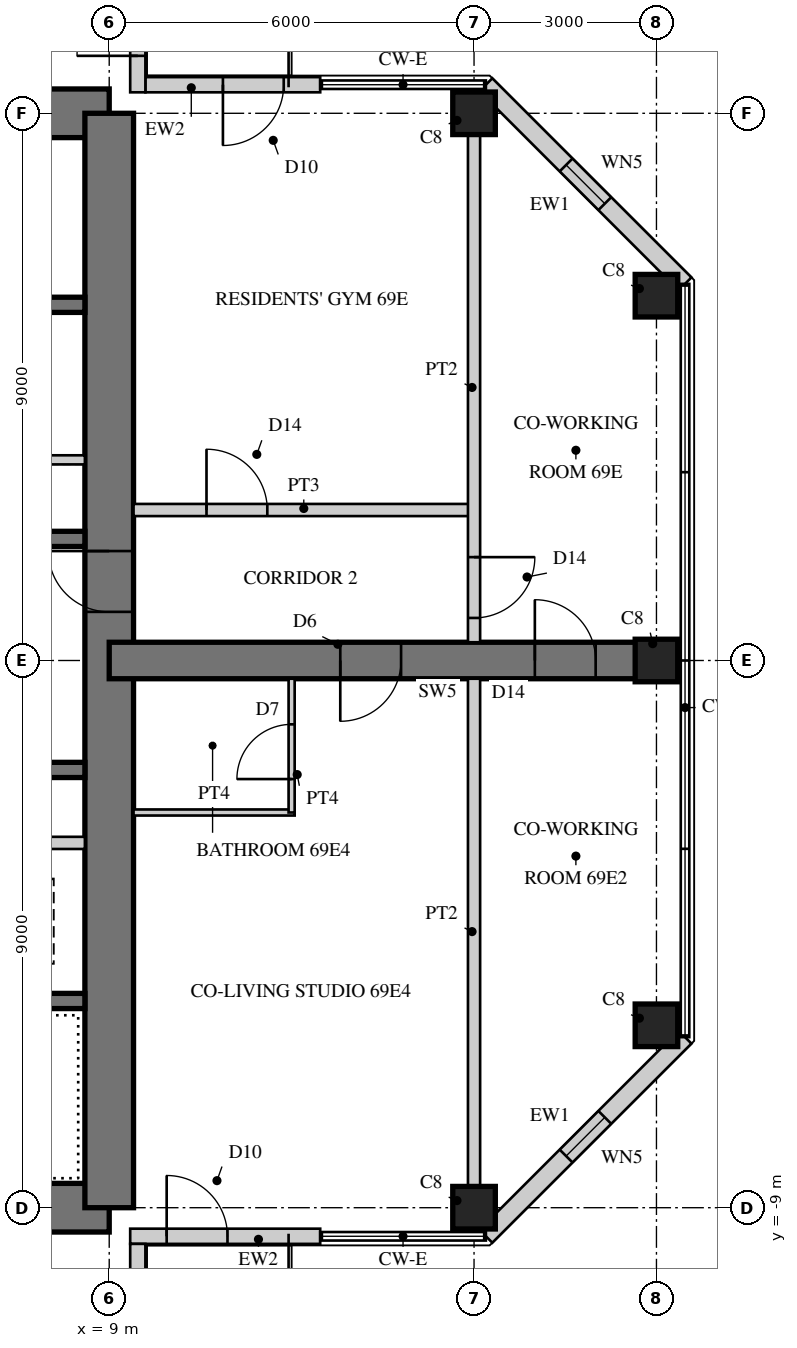
"""IFC4 building model, lengths in metres.
Left out: names, types, materials, properties, quantities, classifications, styles, units other than length and angle.
Written with IfcOpenShell. Run it as: python <this file> out.ifc"""

import sys

from ifc_helpers import new_model, si_unit, direction, frame, frame_2d, origin, origin_2d, place, context, subcontext, project, spatial, rectangle, hollow_rectangle, extrude, element, fill, save


model = new_model("IFC4")
c1 = context("Model", 3, precision=1e-05, world=origin(), true_north=direction((0.0, 1.0)))
c2 = subcontext(c1, "Body", "Model", "MODEL_VIEW")
j1 = project(units=[si_unit("LENGTHUNIT", "METRE"), si_unit("PLANEANGLEUNIT", "RADIAN")], contexts=[c1])
p1 = place(None, origin())
s1 = spatial("IfcSite", under=j1, at=p1, CompositionType="ELEMENT")
p2 = place(p1, origin())
s2 = spatial("IfcBuilding", under=s1, at=p2, CompositionType="ELEMENT")
p3 = place(p2, frame((0.0, 0.0, 267.9)))
s3 = spatial("IfcBuildingStorey", under=s2, at=p3, CompositionType="ELEMENT", Elevation=267.9)
p4 = place(p3, frame((9.0, 9.0, 0.0), z_axis=(0.0, 0.0, 1.0), x_axis=(-1.0, 0.0, 0.0)))
e1 = element("IfcWall", 1, at=p4, inside=s3, PredefinedType="SHEAR", context=c2, shape_type="SweptSolid", body=[
    extrude(rectangle(XDim=18.0, YDim=0.8, at=frame_2d((9.0, 0.0))), origin(), (0.0, 0.0, 1.0), 3.4),
])
p5 = place(p4, frame((9.8, 0.0, 0.0)))
e2 = element("IfcOpeningElement", 2, at=p5, cuts=e1, PredefinedType="OPENING", context=c2, shape_type="SweptSolid", body=[
    extrude(rectangle(XDim=1.0, YDim=2.4, at=frame_2d((0.5, 1.2))), frame((0.0, 0.41, 0.0), z_axis=(0.0, -1.0, 0.0), x_axis=(1.0, 0.0, 0.0)), (0.0, 0.0, 1.0), 0.82),
])
p6 = place(p3, frame((-9.0, -9.0, 0.0), z_axis=(0.0, 0.0, 1.0), x_axis=(1.0, 0.0, 0.0)))
e3 = element("IfcWall", 3, at=p6, inside=s3, PredefinedType="SHEAR", context=c2, shape_type="SweptSolid", body=[
    extrude(rectangle(XDim=18.0, YDim=0.8, at=frame_2d((9.0, 0.0))), origin(), (0.0, 0.0, 1.0), 3.4),
])
p7 = place(p6, frame((9.8, 0.0, 0.0)))
e4 = element("IfcOpeningElement", 4, at=p7, cuts=e3, PredefinedType="OPENING", context=c2, shape_type="SweptSolid", body=[
    extrude(rectangle(XDim=1.0, YDim=2.4, at=frame_2d((0.5, 1.2))), frame((0.0, 0.41, 0.0), z_axis=(0.0, -1.0, 0.0), x_axis=(1.0, 0.0, 0.0)), (0.0, 0.0, 1.0), 0.82),
])
p8 = place(p3, frame((9.0, -9.0, 0.0), z_axis=(0.0, 0.0, 1.0), x_axis=(0.0, 1.0, 0.0)))
e5 = element("IfcWall", 5, at=p8, inside=s3, PredefinedType="SHEAR", context=c2, shape_type="SweptSolid", body=[
    extrude(rectangle(XDim=18.0, YDim=0.8, at=frame_2d((9.0, 0.0))), origin(), (0.0, 0.0, 1.0), 3.4),
])
p9 = place(p8, frame((9.8, 0.0, 0.0)))
e6 = element("IfcOpeningElement", 6, at=p9, cuts=e5, PredefinedType="OPENING", context=c2, shape_type="SweptSolid", body=[
    extrude(rectangle(XDim=1.0, YDim=2.4, at=frame_2d((0.5, 1.2))), frame((0.0, 0.41, 0.0), z_axis=(0.0, -1.0, 0.0), x_axis=(1.0, 0.0, 0.0)), (0.0, 0.0, 1.0), 0.82),
])
p10 = place(p3, frame((1.925, 2.0, 0.0), z_axis=(0.0, 0.0, 1.0), x_axis=(1.0, 0.0, 0.0)))
e7 = element("IfcWall", 7, at=p10, inside=s3, PredefinedType="SHEAR", context=c2, shape_type="SweptSolid", body=[
    extrude(rectangle(XDim=6.675, YDim=0.25, at=frame_2d((3.337, 0.0))), origin(), (0.0, 0.0, 1.0), 3.4),
])
p11 = place(p3, frame((1.925, 5.85, 0.0), z_axis=(0.0, 0.0, 1.0), x_axis=(1.0, 0.0, 0.0)))
e8 = element("IfcWall", 8, at=p11, inside=s3, PredefinedType="SHEAR", context=c2, shape_type="SweptSolid", body=[
    extrude(rectangle(XDim=6.675, YDim=0.25, at=frame_2d((3.337, 0.0))), origin(), (0.0, 0.0, 1.0), 3.4),
])
p12 = place(p11, frame((0.546, 0.0, 0.0)))
e9 = element("IfcOpeningElement", 9, at=p12, cuts=e8, PredefinedType="OPENING", context=c2, shape_type="SweptSolid", body=[
    extrude(rectangle(XDim=1.0, YDim=2.1, at=frame_2d((0.5, 1.05))), frame((0.0, 0.135, 0.0), z_axis=(0.0, -1.0, 0.0), x_axis=(1.0, 0.0, 0.0)), (0.0, 0.0, 1.0), 0.27),
])
p13 = place(p3, frame((1.925, 3.3, 0.0), z_axis=(0.0, 0.0, 1.0), x_axis=(1.0, 0.0, 0.0)))
e10 = element("IfcWall", 10, at=p13, inside=s3, PredefinedType="PARTITIONING", context=c2, shape_type="SweptSolid", body=[
    extrude(rectangle(XDim=6.675, YDim=0.15, at=frame_2d((3.337, 0.0))), origin(), (0.0, 0.0, 1.0), 3.4),
])
p14 = place(p13, frame((0.075, 0.0, 0.0)))
e11 = element("IfcOpeningElement", 11, at=p14, cuts=e10, PredefinedType="OPENING", context=c2, shape_type="SweptSolid", body=[
    extrude(rectangle(XDim=0.8, YDim=2.1, at=frame_2d((0.4, 1.05))), frame((0.0, 0.085, 0.0), z_axis=(0.0, -1.0, 0.0), x_axis=(1.0, 0.0, 0.0)), (0.0, 0.0, 1.0), 0.17),
])
p15 = place(p13, frame((3.675, 0.0, 0.0)))
e12 = element("IfcOpeningElement", 12, at=p15, cuts=e10, PredefinedType="OPENING", context=c2, shape_type="SweptSolid", body=[
    extrude(rectangle(XDim=0.8, YDim=2.1, at=frame_2d((0.4, 1.05))), frame((0.0, 0.085, 0.0), z_axis=(0.0, -1.0, 0.0), x_axis=(1.0, 0.0, 0.0)), (0.0, 0.0, 1.0), 0.17),
])
p16 = place(p3, frame((2.125, -1.8, 0.0), z_axis=(0.0, 0.0, 1.0), x_axis=(1.0, 0.0, 0.0)))
e13 = element("IfcWall", 13, at=p16, inside=s3, PredefinedType="SHEAR", context=c2, shape_type="SweptSolid", body=[
    extrude(rectangle(XDim=6.475, YDim=0.25, at=frame_2d((3.238, 0.0))), origin(), (0.0, 0.0, 1.0), 3.4),
])
p17 = place(p3, frame((2.125, -5.6, 0.0), z_axis=(0.0, 0.0, 1.0), x_axis=(1.0, 0.0, 0.0)))
e14 = element("IfcWall", 14, at=p17, inside=s3, PredefinedType="SHEAR", context=c2, shape_type="SweptSolid", body=[
    extrude(rectangle(XDim=6.475, YDim=0.25, at=frame_2d((3.238, 0.0))), origin(), (0.0, 0.0, 1.0), 3.4),
])
p18 = place(p17, frame((0.175, 0.0, 0.0)))
e15 = element("IfcOpeningElement", 15, at=p18, cuts=e14, PredefinedType="OPENING", context=c2, shape_type="SweptSolid", body=[
    extrude(rectangle(XDim=1.0, YDim=2.1, at=frame_2d((0.5, 1.05))), frame((0.0, 0.135, 0.0), z_axis=(0.0, -1.0, 0.0), x_axis=(1.0, 0.0, 0.0)), (0.0, 0.0, 1.0), 0.27),
])
p19 = place(p3, frame((5.725, -3.0, 0.0), z_axis=(0.0, 0.0, 1.0), x_axis=(1.0, 0.0, 0.0)))
e16 = element("IfcWall", 16, at=p19, inside=s3, PredefinedType="PARTITIONING", context=c2, shape_type="SweptSolid", body=[
    extrude(rectangle(XDim=2.875, YDim=0.2, at=frame_2d((1.438, 0.0))), origin(), (0.0, 0.0, 1.0), 3.4),
])
p20 = place(p3, frame((9.0, 0.0, 0.0), z_axis=(0.0, 0.0, 1.0), x_axis=(1.0, 0.0, 0.0)))
e17 = element("IfcWall", 17, at=p20, inside=s3, PredefinedType="SHEAR", context=c2, shape_type="SweptSolid", body=[
    extrude(rectangle(XDim=9.0, YDim=0.6, at=frame_2d((4.5, 0.0))), origin(), (0.0, 0.0, 1.0), 3.4),
])
p21 = place(p20, frame((3.8, 0.0, 0.0)))
e18 = element("IfcOpeningElement", 18, at=p21, cuts=e17, PredefinedType="OPENING", context=c2, shape_type="SweptSolid", body=[
    extrude(rectangle(XDim=1.0, YDim=2.15, at=frame_2d((0.5, 1.075))), frame((0.0, 0.31, 0.0), z_axis=(0.0, -1.0, 0.0), x_axis=(1.0, 0.0, 0.0)), (0.0, 0.0, 1.0), 0.62),
])
p22 = place(p20, frame((7.0, 0.0, 0.0)))
e19 = element("IfcOpeningElement", 19, at=p22, cuts=e17, PredefinedType="OPENING", context=c2, shape_type="SweptSolid", body=[
    extrude(rectangle(XDim=1.0, YDim=2.2, at=frame_2d((0.5, 1.1))), frame((0.0, 0.31, 0.0), z_axis=(0.0, -1.0, 0.0), x_axis=(1.0, 0.0, 0.0)), (0.0, 0.0, 1.0), 0.62),
])
for number, where, z_axis, x_axis in (
    (20, (15.0, -9.0, 0.0), (0.0, 0.0, 1.0), (1.0, 0.0, 0.0)),
    (21, (15.0, 9.0, 0.0), (0.0, 0.0, 1.0), (1.0, 0.0, 0.0)),
    (22, (18.0, -6.0, 0.0), (0.0, 0.0, 1.0), (1.0, 0.0, 0.0)),
    (23, (18.0, 0.0, 0.0), (0.0, 0.0, 1.0), (1.0, 0.0, 0.0)),
    (24, (18.0, 6.0, 0.0), (0.0, 0.0, 1.0), (1.0, 0.0, 0.0)),
):
    element("IfcColumn", number, at=place(p3, frame(where, z_axis=z_axis, x_axis=x_axis)), inside=s3, PredefinedType="COLUMN", context=c2, shape_type="SweptSolid", body=[
        extrude(rectangle(XDim=0.7, YDim=0.7, at=origin_2d()), origin(), (0.0, 0.0, 1.0), 3.4),
    ])
p23 = place(p3, frame((9.345, -9.47, 0.0), z_axis=(0.0, 0.0, 1.0), x_axis=(1.0, 0.0, 0.0)))
e25 = element("IfcWall", 25, at=p23, inside=s3, PredefinedType="SOLIDWALL", context=c2, shape_type="SweptSolid", body=[
    extrude(rectangle(XDim=3.125, YDim=0.25, at=frame_2d((1.562, 0.0))), origin(), (0.0, 0.0, 1.0), 3.22),
])
p24 = place(p23, frame((0.6, 0.0, 0.0)))
e26 = element("IfcOpeningElement", 26, at=p24, cuts=e25, PredefinedType="OPENING", context=c2, shape_type="SweptSolid", body=[
    extrude(rectangle(XDim=1.0, YDim=2.2, at=frame_2d((0.5, 1.1))), frame((0.0, 0.135, 0.0), z_axis=(0.0, -1.0, 0.0), x_axis=(1.0, 0.0, 0.0)), (0.0, 0.0, 1.0), 0.27),
])
p25 = place(p3, frame((15.195, -9.47, 0.0), z_axis=(0.0, 0.0, 1.0), x_axis=(0.707106781187, 0.707106781187, 0.0)))
e27 = element("IfcWall", 27, at=p25, inside=s3, PredefinedType="SOLIDWALL", context=c2, shape_type="SweptSolid", body=[
    extrude(rectangle(XDim=4.632, YDim=0.3, at=frame_2d((2.316, 0.0))), origin(), (0.0, 0.0, 1.0), 3.22),
])
p26 = place(p25, frame((1.866, 0.0, 0.3)))
e28 = element("IfcOpeningElement", 28, at=p26, cuts=e27, PredefinedType="OPENING", context=c2, shape_type="SweptSolid", body=[
    extrude(rectangle(XDim=0.9, YDim=2.4, at=frame_2d((0.45, 1.2))), frame((0.0, 0.16, 0.0), z_axis=(0.0, -1.0, 0.0), x_axis=(1.0, 0.0, 0.0)), (0.0, 0.0, 1.0), 0.32),
])
p27 = place(p3, frame((18.47, 6.195, 0.0), z_axis=(0.0, 0.0, 1.0), x_axis=(-0.707106781187, 0.707106781187, 0.0)))
e29 = element("IfcWall", 29, at=p27, inside=s3, PredefinedType="SOLIDWALL", context=c2, shape_type="SweptSolid", body=[
    extrude(rectangle(XDim=4.632, YDim=0.3, at=frame_2d((2.316, 0.0))), origin(), (0.0, 0.0, 1.0), 3.22),
])
p28 = place(p27, frame((1.866, 0.0, 0.3)))
e30 = element("IfcOpeningElement", 30, at=p28, cuts=e29, PredefinedType="OPENING", context=c2, shape_type="SweptSolid", body=[
    extrude(rectangle(XDim=0.9, YDim=2.4, at=frame_2d((0.45, 1.2))), frame((0.0, 0.16, 0.0), z_axis=(0.0, -1.0, 0.0), x_axis=(1.0, 0.0, 0.0)), (0.0, 0.0, 1.0), 0.32),
])
p29 = place(p3, frame((12.47, 9.47, 0.0), z_axis=(0.0, 0.0, 1.0), x_axis=(-1.0, 0.0, 0.0)))
e31 = element("IfcWall", 31, at=p29, inside=s3, PredefinedType="SOLIDWALL", context=c2, shape_type="SweptSolid", body=[
    extrude(rectangle(XDim=2.875, YDim=0.25, at=frame_2d((1.438, 0.0))), origin(), (0.0, 0.0, 1.0), 3.22),
])
p30 = place(p29, frame((0.6, 0.0, 0.0)))
e32 = element("IfcOpeningElement", 32, at=p30, cuts=e31, PredefinedType="OPENING", context=c2, shape_type="SweptSolid", body=[
    extrude(rectangle(XDim=1.0, YDim=2.2, at=frame_2d((0.5, 1.1))), frame((0.0, 0.135, 0.0), z_axis=(0.0, -1.0, 0.0), x_axis=(1.0, 0.0, 0.0)), (0.0, 0.0, 1.0), 0.27),
])
p31 = place(p3, frame((9.47, 9.345, 0.0), z_axis=(0.0, 0.0, 1.0), x_axis=(0.0, 1.0, 0.0)))
e33 = element("IfcWall", 33, at=p31, inside=s3, PredefinedType="SOLIDWALL", context=c2, shape_type="SweptSolid", body=[
    extrude(rectangle(XDim=3.125, YDim=0.25, at=frame_2d((1.562, 0.0))), origin(), (0.0, 0.0, 1.0), 3.22),
])
p32 = place(p31, frame((0.6, 0.0, 0.0)))
e34 = element("IfcOpeningElement", 34, at=p32, cuts=e33, PredefinedType="OPENING", context=c2, shape_type="SweptSolid", body=[
    extrude(rectangle(XDim=1.0, YDim=2.2, at=frame_2d((0.5, 1.1))), frame((0.0, 0.135, 0.0), z_axis=(0.0, -1.0, 0.0), x_axis=(1.0, 0.0, 0.0)), (0.0, 0.0, 1.0), 0.27),
])
p33 = place(p3, frame((9.47, -12.47, 0.0), z_axis=(0.0, 0.0, 1.0), x_axis=(0.0, 1.0, 0.0)))
e35 = element("IfcWall", 35, at=p33, inside=s3, PredefinedType="SOLIDWALL", context=c2, shape_type="SweptSolid", body=[
    extrude(rectangle(XDim=2.875, YDim=0.25, at=frame_2d((1.438, 0.0))), origin(), (0.0, 0.0, 1.0), 3.22),
])
p34 = place(p33, frame((0.6, 0.0, 0.0)))
e36 = element("IfcOpeningElement", 36, at=p34, cuts=e35, PredefinedType="OPENING", context=c2, shape_type="SweptSolid", body=[
    extrude(rectangle(XDim=1.0, YDim=2.2, at=frame_2d((0.5, 1.1))), frame((0.0, 0.135, 0.0), z_axis=(0.0, -1.0, 0.0), x_axis=(1.0, 0.0, 0.0)), (0.0, 0.0, 1.0), 0.27),
])
p35 = place(p3, frame((9.4, -2.5, 0.0), z_axis=(0.0, 0.0, 1.0), x_axis=(1.0, 0.0, 0.0)))
e37 = element("IfcWall", 37, at=p35, inside=s3, PredefinedType="PARTITIONING", context=c2, shape_type="SweptSolid", body=[
    extrude(rectangle(XDim=2.65, YDim=0.1, at=frame_2d((1.325, 0.0))), origin(), (0.0, 0.0, 1.0), 3.22),
])
p36 = place(p3, frame((12.0, -2.5, 0.0), z_axis=(0.0, 0.0, 1.0), x_axis=(0.0, 1.0, 0.0)))
e38 = element("IfcWall", 38, at=p36, inside=s3, PredefinedType="PARTITIONING", context=c2, shape_type="SweptSolid", body=[
    extrude(rectangle(XDim=2.2, YDim=0.1, at=frame_2d((1.1, 0.0))), origin(), (0.0, 0.0, 1.0), 3.22),
])
p37 = place(p36, frame((0.55, 0.0, 0.0)))
e39 = element("IfcOpeningElement", 39, at=p37, cuts=e38, PredefinedType="OPENING", context=c2, shape_type="SweptSolid", body=[
    extrude(rectangle(XDim=0.9, YDim=2.1, at=frame_2d((0.45, 1.05))), frame((0.0, 0.06, 0.0), z_axis=(0.0, -1.0, 0.0), x_axis=(1.0, 0.0, 0.0)), (0.0, 0.0, 1.0), 0.12),
])
p38 = place(p3, frame((9.4, 2.475, 0.0), z_axis=(0.0, 0.0, 1.0), x_axis=(1.0, 0.0, 0.0)))
e40 = element("IfcWall", 40, at=p38, inside=s3, PredefinedType="SOLIDWALL", context=c2, shape_type="SweptSolid", body=[
    extrude(rectangle(XDim=5.6, YDim=0.2, at=frame_2d((2.8, 0.0))), origin(), (0.0, 0.0, 1.0), 3.22),
])
p39 = place(p38, frame((1.2, 0.0, 0.0)))
e41 = element("IfcOpeningElement", 41, at=p39, cuts=e40, PredefinedType="OPENING", context=c2, shape_type="SweptSolid", body=[
    extrude(rectangle(XDim=1.0, YDim=2.2, at=frame_2d((0.5, 1.1))), frame((0.0, 0.11, 0.0), z_axis=(0.0, -1.0, 0.0), x_axis=(1.0, 0.0, 0.0)), (0.0, 0.0, 1.0), 0.22),
])
p40 = place(p3, frame((15.0, -8.65, 0.0), z_axis=(0.0, 0.0, 1.0), x_axis=(0.0, 1.0, 0.0)))
e42 = element("IfcWall", 42, at=p40, inside=s3, PredefinedType="SOLIDWALL", context=c2, shape_type="SweptSolid", body=[
    extrude(rectangle(XDim=8.35, YDim=0.2, at=frame_2d((4.175, 0.0))), origin(), (0.0, 0.0, 1.0), 2.52),
])
p41 = place(p3, frame((15.0, 0.3, 0.0), z_axis=(0.0, 0.0, 1.0), x_axis=(0.0, 1.0, 0.0)))
e43 = element("IfcWall", 43, at=p41, inside=s3, PredefinedType="SOLIDWALL", context=c2, shape_type="SweptSolid", body=[
    extrude(rectangle(XDim=8.35, YDim=0.2, at=frame_2d((4.175, 0.0))), origin(), (0.0, 0.0, 1.0), 2.52),
])
p42 = place(p41, frame((0.4, 0.0, 0.0)))
e44 = element("IfcOpeningElement", 44, at=p42, cuts=e43, PredefinedType="OPENING", context=c2, shape_type="SweptSolid", body=[
    extrude(rectangle(XDim=1.0, YDim=2.2, at=frame_2d((0.5, 1.1))), frame((0.0, 0.11, 0.0), z_axis=(0.0, -1.0, 0.0), x_axis=(1.0, 0.0, 0.0)), (0.0, 0.0, 1.0), 0.22),
])
p43 = place(p24, origin())
e45 = element("IfcDoor", 45, at=p43, inside=s3, OperationType="SINGLE_SWING_LEFT", PredefinedType="DOOR", context=c2, shape_type="SweptSolid", body=[
    extrude(hollow_rectangle(XDim=1.0, YDim=2.2, WallThickness=0.06, at=frame_2d((0.5, 1.1))), frame((0.0, 0.025, 0.0), z_axis=(0.0, -1.0, 0.0), x_axis=(1.0, 0.0, 0.0)), (0.0, 0.0, 1.0), 0.05),
    extrude(rectangle(XDim=0.879, YDim=2.079, at=frame_2d((0.5, 1.1))), frame((0.0, 0.025, 0.0), z_axis=(0.0, -1.0, 0.0), x_axis=(1.0, 0.0, 0.0)), (0.0, 0.0, 1.0), 0.05),
])
fill(e26, e45)
p44 = place(p26, origin())
e46 = element("IfcWindow", 46, at=p44, inside=s3, PartitioningType="SINGLE_PANEL", PredefinedType="WINDOW", context=c2, shape_type="SweptSolid", body=[
    extrude(hollow_rectangle(XDim=0.9, YDim=2.4, WallThickness=0.06, at=frame_2d((0.45, 1.2))), frame((0.0, 0.03, 0.0), z_axis=(0.0, -1.0, 0.0), x_axis=(1.0, 0.0, 0.0)), (0.0, 0.0, 1.0), 0.06),
    extrude(rectangle(XDim=0.779, YDim=2.279, at=frame_2d((0.45, 1.2))), frame((0.0, 0.03, 0.0), z_axis=(0.0, -1.0, 0.0), x_axis=(1.0, 0.0, 0.0)), (0.0, 0.0, 1.0), 0.06),
])
fill(e28, e46)
p45 = place(p28, origin())
e47 = element("IfcWindow", 47, at=p45, inside=s3, PartitioningType="SINGLE_PANEL", PredefinedType="WINDOW", context=c2, shape_type="SweptSolid", body=[
    extrude(hollow_rectangle(XDim=0.9, YDim=2.4, WallThickness=0.06, at=frame_2d((0.45, 1.2))), frame((0.0, 0.03, 0.0), z_axis=(0.0, -1.0, 0.0), x_axis=(1.0, 0.0, 0.0)), (0.0, 0.0, 1.0), 0.06),
    extrude(rectangle(XDim=0.779, YDim=2.279, at=frame_2d((0.45, 1.2))), frame((0.0, 0.03, 0.0), z_axis=(0.0, -1.0, 0.0), x_axis=(1.0, 0.0, 0.0)), (0.0, 0.0, 1.0), 0.06),
])
fill(e30, e47)
p46 = place(p30, origin())
e48 = element("IfcDoor", 48, at=p46, inside=s3, OperationType="SINGLE_SWING_RIGHT", PredefinedType="DOOR", context=c2, shape_type="SweptSolid", body=[
    extrude(hollow_rectangle(XDim=1.0, YDim=2.2, WallThickness=0.06, at=frame_2d((0.5, 1.1))), frame((0.0, 0.025, 0.0), z_axis=(0.0, -1.0, 0.0), x_axis=(1.0, 0.0, 0.0)), (0.0, 0.0, 1.0), 0.05),
    extrude(rectangle(XDim=0.879, YDim=2.079, at=frame_2d((0.5, 1.1))), frame((0.0, 0.025, 0.0), z_axis=(0.0, -1.0, 0.0), x_axis=(1.0, 0.0, 0.0)), (0.0, 0.0, 1.0), 0.05),
])
fill(e32, e48)
p47 = place(p32, origin())
e49 = element("IfcDoor", 49, at=p47, inside=s3, OperationType="SINGLE_SWING_LEFT", PredefinedType="DOOR", context=c2, shape_type="SweptSolid", body=[
    extrude(hollow_rectangle(XDim=1.0, YDim=2.2, WallThickness=0.06, at=frame_2d((0.5, 1.1))), frame((0.0, 0.025, 0.0), z_axis=(0.0, -1.0, 0.0), x_axis=(1.0, 0.0, 0.0)), (0.0, 0.0, 1.0), 0.05),
    extrude(rectangle(XDim=0.879, YDim=2.079, at=frame_2d((0.5, 1.1))), frame((0.0, 0.025, 0.0), z_axis=(0.0, -1.0, 0.0), x_axis=(1.0, 0.0, 0.0)), (0.0, 0.0, 1.0), 0.05),
])
fill(e34, e49)
p48 = place(p37, origin())
e50 = element("IfcDoor", 50, at=p48, inside=s3, OperationType="SINGLE_SWING_LEFT", PredefinedType="DOOR", context=c2, shape_type="SweptSolid", body=[
    extrude(rectangle(XDim=0.9, YDim=2.1, at=frame_2d((0.45, 1.05))), frame((0.0, 0.025, 0.0), z_axis=(0.0, -1.0, 0.0), x_axis=(1.0, 0.0, 0.0)), (0.0, 0.0, 1.0), 0.05),
])
fill(e39, e50)
p49 = place(p39, origin())
e51 = element("IfcDoor", 51, at=p49, inside=s3, OperationType="SINGLE_SWING_LEFT", PredefinedType="DOOR", context=c2, shape_type="SweptSolid", body=[
    extrude(rectangle(XDim=1.0, YDim=2.2, at=frame_2d((0.5, 1.1))), frame((0.0, 0.025, 0.0), z_axis=(0.0, -1.0, 0.0), x_axis=(1.0, 0.0, 0.0)), (0.0, 0.0, 1.0), 0.05),
])
fill(e41, e51)
p50 = place(p42, frame((1.0, 0.0, 0.0), z_axis=(0.0, 0.0, 1.0), x_axis=(-1.0, 0.0, 0.0)))
e52 = element("IfcDoor", 52, at=p50, inside=s3, OperationType="SINGLE_SWING_LEFT", PredefinedType="DOOR", context=c2, shape_type="SweptSolid", body=[
    extrude(rectangle(XDim=1.0, YDim=2.2, at=frame_2d((0.5, 1.1))), frame((0.0, 0.025, 0.0), z_axis=(0.0, -1.0, 0.0), x_axis=(1.0, 0.0, 0.0)), (0.0, 0.0, 1.0), 0.05),
])
fill(e44, e52)
p51 = place(p21, frame((1.0, 0.0, 0.0), z_axis=(0.0, 0.0, 1.0), x_axis=(-1.0, 0.0, 0.0)))
e53 = element("IfcDoor", 53, at=p51, inside=s3, OperationType="SINGLE_SWING_RIGHT", PredefinedType="DOOR", context=c2, shape_type="SweptSolid", body=[
    extrude(rectangle(XDim=1.0, YDim=2.15, at=frame_2d((0.5, 1.075))), frame((0.0, 0.025, 0.0), z_axis=(0.0, -1.0, 0.0), x_axis=(1.0, 0.0, 0.0)), (0.0, 0.0, 1.0), 0.05),
])
fill(e18, e53)
p52 = place(p22, origin())
e54 = element("IfcDoor", 54, at=p52, inside=s3, OperationType="SINGLE_SWING_LEFT", PredefinedType="DOOR", context=c2, shape_type="SweptSolid", body=[
    extrude(rectangle(XDim=1.0, YDim=2.2, at=frame_2d((0.5, 1.1))), frame((0.0, 0.025, 0.0), z_axis=(0.0, -1.0, 0.0), x_axis=(1.0, 0.0, 0.0)), (0.0, 0.0, 1.0), 0.05),
])
fill(e19, e54)
p53 = place(p9, origin())
e55 = element("IfcDoor", 55, at=p53, inside=s3, OperationType="SINGLE_SWING_RIGHT", PredefinedType="DOOR", context=c2, shape_type="SweptSolid", body=[
    extrude(rectangle(XDim=1.0, YDim=2.4, at=frame_2d((0.5, 1.2))), frame((0.0, 0.055, 0.0), z_axis=(0.0, -1.0, 0.0), x_axis=(1.0, 0.0, 0.0)), (0.0, 0.0, 1.0), 0.05),
])
fill(e6, e55)
save(model, sys.argv[1])
